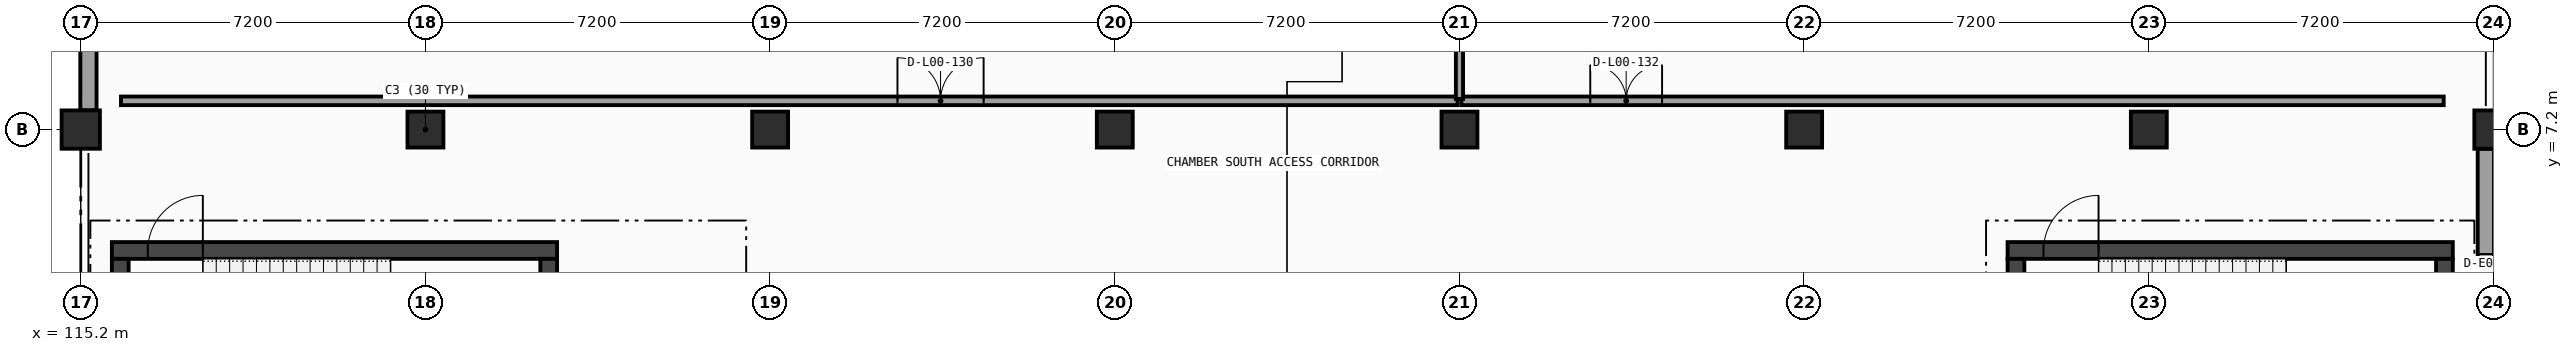
"""IFC4 building model, lengths in metres.
Left out: names, types, materials, properties, quantities, classifications, styles, units other than length and angle.
Written with IfcOpenShell. Run it as: python <this file> out.ifc"""

import sys

from ifc_helpers import new_model, si_unit, direction, frame, frame_2d, origin, origin_2d, place, context, subcontext, project, spatial, rectangle, extrude, element, fill, save


model = new_model("IFC4")
c1 = context("Model", 3, precision=1e-05, world=origin(), true_north=direction((0.0, 1.0)))
c2 = subcontext(c1, "Body", "Model", "MODEL_VIEW")
j1 = project(units=[si_unit("LENGTHUNIT", "METRE"), si_unit("PLANEANGLEUNIT", "RADIAN")], contexts=[c1])
p1 = place(None, origin())
s1 = spatial("IfcSite", under=j1, at=p1, CompositionType="ELEMENT")
p2 = place(p1, origin())
s2 = spatial("IfcBuilding", under=s1, at=p2, CompositionType="ELEMENT")
p3 = place(p2, origin())
s3 = spatial("IfcBuildingStorey", under=s2, at=p3, CompositionType="ELEMENT", Elevation=0.0)
p4 = place(p3, frame((115.2, 7.2, 0.0), z_axis=(0.0, 0.0, 1.0), x_axis=(1.0, 0.0, 0.0)))
e1 = element("IfcColumn", 1, at=p4, inside=s3, PredefinedType="COLUMN", context=c2, shape_type="SweptSolid", body=[
    extrude(rectangle(XDim=0.8, YDim=0.8, at=origin_2d()), origin(), (0.0, 0.0, 1.0), 5.4),
])
for number, where, z_axis, x_axis in (
    (2, (122.4, 7.2, 0.0), (0.0, 0.0, 1.0), (1.0, 0.0, 0.0)),
    (3, (129.6, 7.2, 0.0), (0.0, 0.0, 1.0), (1.0, 0.0, 0.0)),
    (4, (136.8, 7.2, 0.0), (0.0, 0.0, 1.0), (1.0, 0.0, 0.0)),
    (5, (144.0, 7.2, 0.0), (0.0, 0.0, 1.0), (1.0, 0.0, 0.0)),
    (6, (151.2, 7.2, 0.0), (0.0, 0.0, 1.0), (1.0, 0.0, 0.0)),
    (7, (158.4, 7.2, 0.0), (0.0, 0.0, 1.0), (1.0, 0.0, 0.0)),
):
    element("IfcColumn", number, at=place(p3, frame(where, z_axis=z_axis, x_axis=x_axis)), inside=s3, PredefinedType="COLUMN", context=c2, shape_type="SweptSolid", body=[
        extrude(rectangle(XDim=0.75, YDim=0.75, at=origin_2d()), origin(), (0.0, 0.0, 1.0), 5.4),
    ])
p5 = place(p3, frame((165.6, 7.2, 0.0), z_axis=(0.0, 0.0, 1.0), x_axis=(1.0, 0.0, 0.0)))
e8 = element("IfcColumn", 8, at=p5, inside=s3, PredefinedType="COLUMN", context=c2, shape_type="SweptSolid", body=[
    extrude(rectangle(XDim=0.8, YDim=0.8, at=origin_2d()), origin(), (0.0, 0.0, 1.0), 5.4),
])
p6 = place(p3, frame((165.44, 6.799, 0.0), z_axis=(0.0, 0.0, 1.0), x_axis=(0.0, -1.0, 0.0)))
e9 = element("IfcWall", 9, at=p6, inside=s3, PredefinedType="SOLIDWALL", context=c2, shape_type="SweptSolid", body=[
    extrude(rectangle(XDim=6.398, YDim=0.34, at=frame_2d((3.199, 0.0))), origin(), (0.0, 0.0, 1.0), 4.461),
])
p7 = place(p6, frame((2.199, 0.0, 0.0)))
e10 = element("IfcOpeningElement", 10, at=p7, cuts=e9, PredefinedType="OPENING", context=c2, shape_type="SweptSolid", body=[
    extrude(rectangle(XDim=2.0, YDim=2.25, at=frame_2d((1.0, 1.125))), frame((0.0, 0.18, 0.0), z_axis=(0.0, -1.0, 0.0), x_axis=(1.0, 0.0, 0.0)), (0.0, 0.0, 1.0), 0.36),
])
p8 = place(p3, frame((115.36, 7.601, 0.0), z_axis=(0.0, 0.0, 1.0), x_axis=(0.0, 1.0, 0.0)))
e11 = element("IfcWall", 11, at=p8, inside=s3, PredefinedType="SOLIDWALL", context=c2, shape_type="SweptSolid", body=[
    extrude(rectangle(XDim=6.398, YDim=0.34, at=frame_2d((3.199, 0.0))), origin(), (0.0, 0.0, 1.0), 4.461),
])
p9 = place(p8, frame((2.199, 0.0, 0.0)))
e12 = element("IfcOpeningElement", 12, at=p9, cuts=e11, PredefinedType="OPENING", context=c2, shape_type="SweptSolid", body=[
    extrude(rectangle(XDim=2.0, YDim=2.25, at=frame_2d((1.0, 1.125))), frame((0.0, 0.18, 0.0), z_axis=(0.0, -1.0, 0.0), x_axis=(1.0, 0.0, 0.0)), (0.0, 0.0, 1.0), 0.36),
])
p10 = place(p3, frame((125.15, 4.675, 0.0), z_axis=(0.0, 0.0, 1.0), x_axis=(-1.0, 0.0, 0.0)))
e13 = element("IfcWall", 13, at=p10, inside=s3, PredefinedType="SHEAR", context=c2, shape_type="SweptSolid", body=[
    extrude(rectangle(XDim=9.3, YDim=0.35, at=frame_2d((4.65, 0.0))), origin(), (0.0, 0.0, 1.0), 5.12),
])
p11 = place(p10, frame((7.4, 0.0, 0.0)))
e14 = element("IfcOpeningElement", 14, at=p11, cuts=e13, PredefinedType="OPENING", context=c2, shape_type="SweptSolid", body=[
    extrude(rectangle(XDim=1.15, YDim=2.1, at=frame_2d((0.575, 1.05))), frame((0.0, 0.185, 0.0), z_axis=(0.0, -1.0, 0.0), x_axis=(1.0, 0.0, 0.0)), (0.0, 0.0, 1.0), 0.37),
])
for number, where, z_axis, x_axis in (
    (15, (116.025, 4.5, 0.0), (0.0, 0.0, 1.0), (0.0, -1.0, 0.0)),
    (16, (124.975, 1.2, 0.0), (0.0, 0.0, 1.0), (0.0, 1.0, 0.0)),
):
    element("IfcWall", number, at=place(p3, frame(where, z_axis=z_axis, x_axis=x_axis)), inside=s3, PredefinedType="SHEAR", context=c2, shape_type="SweptSolid", body=[
        extrude(rectangle(XDim=3.3, YDim=0.35, at=frame_2d((1.65, 0.0))), origin(), (0.0, 0.0, 1.0), 5.12),
    ])
p12 = place(p3, frame((164.75, 4.675, 0.0), z_axis=(0.0, 0.0, 1.0), x_axis=(-1.0, 0.0, 0.0)))
e17 = element("IfcWall", 17, at=p12, inside=s3, PredefinedType="SHEAR", context=c2, shape_type="SweptSolid", body=[
    extrude(rectangle(XDim=9.3, YDim=0.35, at=frame_2d((4.65, 0.0))), origin(), (0.0, 0.0, 1.0), 5.12),
])
p13 = place(p12, frame((7.4, 0.0, 0.0)))
e18 = element("IfcOpeningElement", 18, at=p13, cuts=e17, PredefinedType="OPENING", context=c2, shape_type="SweptSolid", body=[
    extrude(rectangle(XDim=1.15, YDim=2.1, at=frame_2d((0.575, 1.05))), frame((0.0, 0.185, 0.0), z_axis=(0.0, -1.0, 0.0), x_axis=(1.0, 0.0, 0.0)), (0.0, 0.0, 1.0), 0.37),
])
for number, where, z_axis, x_axis in (
    (19, (155.625, 4.5, 0.0), (0.0, 0.0, 1.0), (0.0, -1.0, 0.0)),
    (20, (164.575, 1.2, 0.0), (0.0, 0.0, 1.0), (0.0, 1.0, 0.0)),
):
    element("IfcWall", number, at=place(p3, frame(where, z_axis=z_axis, x_axis=x_axis)), inside=s3, PredefinedType="SHEAR", context=c2, shape_type="SweptSolid", body=[
        extrude(rectangle(XDim=3.3, YDim=0.35, at=frame_2d((1.65, 0.0))), origin(), (0.0, 0.0, 1.0), 5.12),
    ])
p14 = place(p3, frame((116.04, 7.8, 0.0), z_axis=(0.0, 0.0, 1.0), x_axis=(1.0, 0.0, 0.0)))
e21 = element("IfcWall", 21, at=p14, inside=s3, PredefinedType="PARTITIONING", context=c2, shape_type="SweptSolid", body=[
    extrude(rectangle(XDim=27.92, YDim=0.18, at=frame_2d((13.96, 0.0))), origin(), (0.0, 0.0, 1.0), 4.311),
])
p15 = place(p14, frame((16.22, 0.0, 0.0)))
e22 = element("IfcOpeningElement", 22, at=p15, cuts=e21, PredefinedType="OPENING", context=c2, shape_type="SweptSolid", body=[
    extrude(rectangle(XDim=1.8, YDim=2.15, at=frame_2d((0.9, 1.075))), frame((0.0, 0.1, 0.0), z_axis=(0.0, -1.0, 0.0), x_axis=(1.0, 0.0, 0.0)), (0.0, 0.0, 1.0), 0.2),
])
p16 = place(p3, frame((144.04, 7.8, 0.0), z_axis=(0.0, 0.0, 1.0), x_axis=(1.0, 0.0, 0.0)))
e23 = element("IfcWall", 23, at=p16, inside=s3, PredefinedType="PARTITIONING", context=c2, shape_type="SweptSolid", body=[
    extrude(rectangle(XDim=20.52, YDim=0.18, at=frame_2d((10.26, 0.0))), origin(), (0.0, 0.0, 1.0), 4.311),
])
p17 = place(p16, frame((2.692, 0.0, 0.0)))
e24 = element("IfcOpeningElement", 24, at=p17, cuts=e23, PredefinedType="OPENING", context=c2, shape_type="SweptSolid", body=[
    extrude(rectangle(XDim=1.5, YDim=2.1, at=frame_2d((0.75, 1.05))), frame((0.0, 0.1, 0.0), z_axis=(0.0, -1.0, 0.0), x_axis=(1.0, 0.0, 0.0)), (0.0, 0.0, 1.0), 0.2),
])
p18 = place(p3, frame((144.0, 7.84, 0.0), z_axis=(0.0, 0.0, 1.0), x_axis=(0.0, 1.0, 0.0)))
e25 = element("IfcWall", 25, at=p18, inside=s3, PredefinedType="PARTITIONING", context=c2, shape_type="SweptSolid", body=[
    extrude(rectangle(XDim=17.12, YDim=0.15, at=frame_2d((8.56, 0.0))), origin(), (0.0, 0.0, 1.0), 4.311),
])
p19 = place(p18, frame((2.268, 0.0, 0.0)))
e26 = element("IfcOpeningElement", 26, at=p19, cuts=e25, PredefinedType="OPENING", context=c2, shape_type="SweptSolid", body=[
    extrude(rectangle(XDim=1.5, YDim=2.1, at=frame_2d((0.75, 1.05))), frame((0.0, 0.085, 0.0), z_axis=(0.0, -1.0, 0.0), x_axis=(1.0, 0.0, 0.0)), (0.0, 0.0, 1.0), 0.17),
])
p20 = place(p7, origin())
e27 = element("IfcDoor", 27, at=p20, inside=s3, OperationType="DOUBLE_DOOR_SINGLE_SWING", PredefinedType="DOOR", context=c2, shape_type="SweptSolid", body=[
    extrude(rectangle(XDim=2.0, YDim=2.25, at=frame_2d((1.0, 1.125))), frame((0.0, 0.025, 0.0), z_axis=(0.0, -1.0, 0.0), x_axis=(1.0, 0.0, 0.0)), (0.0, 0.0, 1.0), 0.05),
])
fill(e10, e27)
p21 = place(p11, frame((1.15, 0.0, 0.0), z_axis=(0.0, 0.0, 1.0), x_axis=(-1.0, 0.0, 0.0)))
e28 = element("IfcDoor", 28, at=p21, inside=s3, OperationType="SINGLE_SWING_RIGHT", PredefinedType="DOOR", context=c2, shape_type="SweptSolid", body=[
    extrude(rectangle(XDim=1.15, YDim=2.1, at=frame_2d((0.575, 1.05))), frame((0.0, 0.025, 0.0), z_axis=(0.0, -1.0, 0.0), x_axis=(1.0, 0.0, 0.0)), (0.0, 0.0, 1.0), 0.05),
])
fill(e14, e28)
p22 = place(p13, frame((1.15, 0.0, 0.0), z_axis=(0.0, 0.0, 1.0), x_axis=(-1.0, 0.0, 0.0)))
e29 = element("IfcDoor", 29, at=p22, inside=s3, OperationType="SINGLE_SWING_RIGHT", PredefinedType="DOOR", context=c2, shape_type="SweptSolid", body=[
    extrude(rectangle(XDim=1.15, YDim=2.1, at=frame_2d((0.575, 1.05))), frame((0.0, 0.025, 0.0), z_axis=(0.0, -1.0, 0.0), x_axis=(1.0, 0.0, 0.0)), (0.0, 0.0, 1.0), 0.05),
])
fill(e18, e29)
p23 = place(p15, origin())
e30 = element("IfcDoor", 30, at=p23, inside=s3, OperationType="DOUBLE_DOOR_SINGLE_SWING", PredefinedType="DOOR", context=c2, shape_type="SweptSolid", body=[
    extrude(rectangle(XDim=1.8, YDim=2.15, at=frame_2d((0.9, 1.075))), frame((0.0, 0.025, 0.0), z_axis=(0.0, -1.0, 0.0), x_axis=(1.0, 0.0, 0.0)), (0.0, 0.0, 1.0), 0.05),
])
fill(e22, e30)
p24 = place(p17, origin())
e31 = element("IfcDoor", 31, at=p24, inside=s3, OperationType="DOUBLE_DOOR_SINGLE_SWING", PredefinedType="DOOR", context=c2, shape_type="SweptSolid", body=[
    extrude(rectangle(XDim=1.5, YDim=2.1, at=frame_2d((0.75, 1.05))), frame((0.0, 0.025, 0.0), z_axis=(0.0, -1.0, 0.0), x_axis=(1.0, 0.0, 0.0)), (0.0, 0.0, 1.0), 0.05),
])
fill(e24, e31)
save(model, sys.argv[1])
